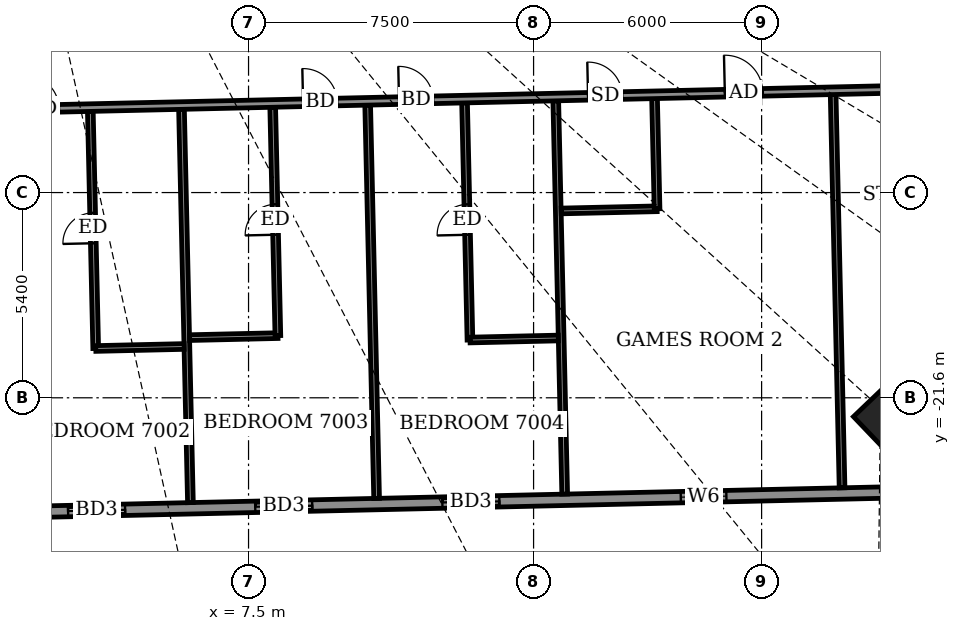
"""IFC4 building model, lengths in metres.
Left out: names, types, materials, properties, quantities, classifications, styles, units other than length and angle.
Written with IfcOpenShell. Run it as: python <this file> out.ifc"""

import sys

from ifc_helpers import new_model, si_unit, direction, frame, frame_2d, origin, origin_2d, place, context, subcontext, project, spatial, rectangle, extrude, element, fill, save


model = new_model("IFC4")
c1 = context("Model", 3, precision=1e-05, world=origin(), true_north=direction((0.0, 1.0)))
c2 = subcontext(c1, "Body", "Model", "MODEL_VIEW")
j1 = project(units=[si_unit("LENGTHUNIT", "METRE"), si_unit("PLANEANGLEUNIT", "RADIAN")], contexts=[c1])
p1 = place(None, origin())
s1 = spatial("IfcSite", under=j1, at=p1, CompositionType="ELEMENT")
p2 = place(p1, origin())
s2 = spatial("IfcBuilding", under=s1, at=p2, CompositionType="ELEMENT")
p3 = place(p2, frame((0.0, 0.0, 275.3)))
s3 = spatial("IfcBuildingStorey", under=s2, at=p3, CompositionType="ELEMENT", Elevation=275.3)
p4 = place(p3, frame((24.124, -22.113, -0.55), z_axis=(0.0, 0.0, 1.0), x_axis=(0.722976563275, 0.690872556232, 0.0)))
e1 = element("IfcColumn", 1, at=p4, inside=s3, PredefinedType="COLUMN", context=c2, shape_type="SweptSolid", body=[
    extrude(rectangle(XDim=1.0, YDim=1.0, at=origin_2d()), origin(), (0.0, 0.0, 1.0), 4.6),
])
p5 = place(p3, frame((-22.816, -25.161, 0.0), z_axis=(0.0, 0.0, 1.0), x_axis=(0.999742646411, 0.022685699159, 0.0)))
e2 = element("IfcWall", 2, at=p5, inside=s3, PredefinedType="SOLIDWALL", context=c2, shape_type="SweptSolid", body=[
    extrude(rectangle(XDim=49.236, YDim=0.3, at=frame_2d((24.618, 0.0))), origin(), (0.0, 0.0, 1.0), 2.1),
])
p6 = place(p5, frame((2.56, 0.0, 0.0)))
e3 = element("IfcOpeningElement", 3, at=p6, cuts=e2, PredefinedType="OPENING", context=c2, shape_type="SweptSolid", body=[
    extrude(rectangle(XDim=1.5, YDim=2.0, at=frame_2d((0.75, 1.0))), frame((0.0, 0.16, 0.0), z_axis=(0.0, -1.0, 0.0), x_axis=(1.0, 0.0, 0.0)), (0.0, 0.0, 1.0), 0.32),
])
p7 = place(p5, frame((9.417, 0.0, 0.5)))
e4 = element("IfcOpeningElement", 4, at=p7, cuts=e2, PredefinedType="OPENING", context=c2, shape_type="SweptSolid", body=[
    extrude(rectangle(XDim=1.2, YDim=1.1, at=frame_2d((0.6, 0.55))), frame((0.0, 0.16, 0.0), z_axis=(0.0, -1.0, 0.0), x_axis=(1.0, 0.0, 0.0)), (0.0, 0.0, 1.0), 0.32),
])
p8 = place(p5, frame((15.664, 0.0, 0.5)))
e5 = element("IfcOpeningElement", 5, at=p8, cuts=e2, PredefinedType="OPENING", context=c2, shape_type="SweptSolid", body=[
    extrude(rectangle(XDim=1.2, YDim=1.1, at=frame_2d((0.6, 0.55))), frame((0.0, 0.16, 0.0), z_axis=(0.0, -1.0, 0.0), x_axis=(1.0, 0.0, 0.0)), (0.0, 0.0, 1.0), 0.32),
])
p9 = place(p5, frame((21.326, 0.0, 0.0)))
e6 = element("IfcOpeningElement", 6, at=p9, cuts=e2, PredefinedType="OPENING", context=c2, shape_type="SweptSolid", body=[
    extrude(rectangle(XDim=1.5, YDim=2.0, at=frame_2d((0.75, 1.0))), frame((0.0, 0.16, 0.0), z_axis=(0.0, -1.0, 0.0), x_axis=(1.0, 0.0, 0.0)), (0.0, 0.0, 1.0), 0.32),
])
p10 = place(p5, frame((25.575, 0.0, 0.0)))
e7 = element("IfcOpeningElement", 7, at=p10, cuts=e2, PredefinedType="OPENING", context=c2, shape_type="SweptSolid", body=[
    extrude(rectangle(XDim=1.5, YDim=2.0, at=frame_2d((0.75, 1.0))), frame((0.0, 0.16, 0.0), z_axis=(0.0, -1.0, 0.0), x_axis=(1.0, 0.0, 0.0)), (0.0, 0.0, 1.0), 0.32),
])
p11 = place(p5, frame((30.5, 0.0, 0.0)))
e8 = element("IfcOpeningElement", 8, at=p11, cuts=e2, PredefinedType="OPENING", context=c2, shape_type="SweptSolid", body=[
    extrude(rectangle(XDim=1.5, YDim=2.0, at=frame_2d((0.75, 1.0))), frame((0.0, 0.16, 0.0), z_axis=(0.0, -1.0, 0.0), x_axis=(1.0, 0.0, 0.0)), (0.0, 0.0, 1.0), 0.32),
])
p12 = place(p5, frame((35.425, 0.0, 0.0)))
e9 = element("IfcOpeningElement", 9, at=p12, cuts=e2, PredefinedType="OPENING", context=c2, shape_type="SweptSolid", body=[
    extrude(rectangle(XDim=1.5, YDim=2.0, at=frame_2d((0.75, 1.0))), frame((0.0, 0.16, 0.0), z_axis=(0.0, -1.0, 0.0), x_axis=(1.0, 0.0, 0.0)), (0.0, 0.0, 1.0), 0.32),
])
p13 = place(p5, frame((41.7, 0.0, 0.5)))
e10 = element("IfcOpeningElement", 10, at=p13, cuts=e2, PredefinedType="OPENING", context=c2, shape_type="SweptSolid", body=[
    extrude(rectangle(XDim=1.2, YDim=1.1, at=frame_2d((0.6, 0.55))), frame((0.0, 0.16, 0.0), z_axis=(0.0, -1.0, 0.0), x_axis=(1.0, 0.0, 0.0)), (0.0, 0.0, 1.0), 0.32),
])
p14 = place(p5, frame((47.068, 0.0, 0.5)))
e11 = element("IfcOpeningElement", 11, at=p14, cuts=e2, PredefinedType="OPENING", context=c2, shape_type="SweptSolid", body=[
    extrude(rectangle(XDim=1.2, YDim=1.1, at=frame_2d((0.6, 0.55))), frame((0.0, 0.16, 0.0), z_axis=(0.0, -1.0, 0.0), x_axis=(1.0, 0.0, 0.0)), (0.0, 0.0, 1.0), 0.32),
])
p15 = place(p3, frame((5.971, -24.358, 0.0), z_axis=(0.0, 0.0, 1.0), x_axis=(-0.022690865001, 0.999742529177, 0.0)))
e12 = element("IfcWall", 12, at=p15, inside=s3, PredefinedType="PARTITIONING", context=c2, shape_type="SweptSolid", body=[
    extrude(rectangle(XDim=10.351, YDim=0.15, at=frame_2d((5.175, 0.0))), origin(), (0.0, 0.0, 1.0), 2.55),
])
p16 = place(p3, frame((10.87, -24.247, 0.0), z_axis=(0.0, 0.0, 1.0), x_axis=(-0.022713904397, 0.999742005993, 0.0)))
e13 = element("IfcWall", 13, at=p16, inside=s3, PredefinedType="PARTITIONING", context=c2, shape_type="SweptSolid", body=[
    extrude(rectangle(XDim=10.351, YDim=0.15, at=frame_2d((5.175, 0.0))), origin(), (0.0, 0.0, 1.0), 2.1),
])
p17 = place(p3, frame((15.819, -24.134, 0.0), z_axis=(0.0, 0.0, 1.0), x_axis=(-0.022716582742, 0.999741945138, 0.0)))
e14 = element("IfcWall", 14, at=p17, inside=s3, PredefinedType="PARTITIONING", context=c2, shape_type="SweptSolid", body=[
    extrude(rectangle(XDim=10.35, YDim=0.15, at=frame_2d((5.175, 0.0))), origin(), (0.0, 0.0, 1.0), 2.1),
])
p18 = place(p3, frame((23.117, -23.969, 0.0), z_axis=(0.0, 0.0, 1.0), x_axis=(-0.022690865001, 0.999742529177, 0.0)))
e15 = element("IfcWall", 15, at=p18, inside=s3, PredefinedType="PARTITIONING", context=c2, shape_type="SweptSolid", body=[
    extrude(rectangle(XDim=10.351, YDim=0.15, at=frame_2d((5.175, 0.0))), origin(), (0.0, 0.0, 1.0), 2.25),
])
p19 = place(p3, frame((3.479, -20.303, 0.0), z_axis=(0.0, 0.0, 1.0), x_axis=(-0.022772066746, 0.999740682865, 0.0)))
e16 = element("IfcWall", 16, at=p19, inside=s3, PredefinedType="PARTITIONING", context=c2, shape_type="SweptSolid", body=[
    extrude(rectangle(XDim=6.24, YDim=0.15, at=frame_2d((3.12, 0.0))), origin(), (0.0, 0.0, 1.0), 2.55),
])
p20 = place(p19, frame((2.77, 0.0, 0.0)))
e17 = element("IfcOpeningElement", 17, at=p20, cuts=e16, PredefinedType="OPENING", context=c2, shape_type="SweptSolid", body=[
    extrude(rectangle(XDim=0.8, YDim=2.1, at=frame_2d((0.4, 1.05))), frame((0.0, 0.085, 0.0), z_axis=(0.0, -1.0, 0.0), x_axis=(1.0, 0.0, 0.0)), (0.0, 0.0, 1.0), 0.17),
])
p21 = place(p3, frame((3.481, -20.303, 0.0), z_axis=(0.0, 0.0, 1.0), x_axis=(0.999740260747, 0.02279059109, 0.0)))
e18 = element("IfcWall", 18, at=p21, inside=s3, PredefinedType="PARTITIONING", context=c2, shape_type="SweptSolid", body=[
    extrude(rectangle(XDim=2.324, YDim=0.15, at=frame_2d((1.162, 0.0))), origin(), (0.0, 0.0, 1.0), 2.55),
])
p22 = place(p3, frame((13.326, -20.08, 0.0), z_axis=(0.0, 0.0, 1.0), x_axis=(-0.02272940328, 0.999741653742, 0.0)))
e19 = element("IfcWall", 19, at=p22, inside=s3, PredefinedType="PARTITIONING", context=c2, shape_type="SweptSolid", body=[
    extrude(rectangle(XDim=6.241, YDim=0.15, at=frame_2d((3.12, 0.0))), origin(), (0.0, 0.0, 1.0), 2.1),
])
p23 = place(p22, frame((2.77, 0.0, 0.0)))
e20 = element("IfcOpeningElement", 20, at=p23, cuts=e19, PredefinedType="OPENING", context=c2, shape_type="SweptSolid", body=[
    extrude(rectangle(XDim=0.8, YDim=2.1, at=frame_2d((0.4, 1.05))), frame((0.0, 0.085, 0.0), z_axis=(0.0, -1.0, 0.0), x_axis=(1.0, 0.0, 0.0)), (0.0, 0.0, 1.0), 0.17),
])
p24 = place(p3, frame((13.328, -20.08, 0.0), z_axis=(0.0, 0.0, 1.0), x_axis=(0.99974031529, 0.022788198363, 0.0)))
e21 = element("IfcWall", 21, at=p24, inside=s3, PredefinedType="PARTITIONING", context=c2, shape_type="SweptSolid", body=[
    extrude(rectangle(XDim=2.325, YDim=0.15, at=frame_2d((1.162, 0.0))), origin(), (0.0, 0.0, 1.0), 2.1),
])
p25 = place(p3, frame((5.95, -20.017, 0.0), z_axis=(0.0, 0.0, 1.0), x_axis=(0.999740260747, 0.02279059109, 0.0)))
e22 = element("IfcWall", 22, at=p25, inside=s3, PredefinedType="PARTITIONING", context=c2, shape_type="SweptSolid", body=[
    extrude(rectangle(XDim=2.324, YDim=0.15, at=frame_2d((1.162, 0.0))), origin(), (0.0, 0.0, 1.0), 4.05),
])
p26 = place(p3, frame((8.272, -19.964, 0.0), z_axis=(0.0, 0.0, 1.0), x_axis=(-0.022628200247, 0.999743949496, 0.0)))
e23 = element("IfcWall", 23, at=p26, inside=s3, PredefinedType="PARTITIONING", context=c2, shape_type="SweptSolid", body=[
    extrude(rectangle(XDim=6.01, YDim=0.15, at=frame_2d((3.005, 0.0))), origin(), (0.0, 0.0, 1.0), 2.35),
])
p27 = place(p26, frame((2.655, 0.0, 0.0)))
e24 = element("IfcOpeningElement", 24, at=p27, cuts=e23, PredefinedType="OPENING", context=c2, shape_type="SweptSolid", body=[
    extrude(rectangle(XDim=0.8, YDim=2.1, at=frame_2d((0.4, 1.05))), frame((0.0, 0.085, 0.0), z_axis=(0.0, -1.0, 0.0), x_axis=(1.0, 0.0, 0.0)), (0.0, 0.0, 1.0), 0.17),
])
p28 = place(p3, frame((15.727, -16.684, 0.0), z_axis=(0.0, 0.0, 1.0), x_axis=(0.99974392816, 0.022629142889, 0.0)))
e25 = element("IfcWall", 25, at=p28, inside=s3, PredefinedType="PARTITIONING", context=c2, shape_type="SweptSolid", body=[
    extrude(rectangle(XDim=2.525, YDim=0.15, at=frame_2d((1.262, 0.0))), origin(), (0.0, 0.0, 1.0), 2.45),
])
p29 = place(p3, frame((18.249, -16.627, 0.0), z_axis=(0.0, 0.0, 1.0), x_axis=(-0.022732880677, 0.999741574676, 0.0)))
e26 = element("IfcWall", 26, at=p29, inside=s3, PredefinedType="PARTITIONING", context=c2, shape_type="SweptSolid", body=[
    extrude(rectangle(XDim=2.9, YDim=0.15, at=frame_2d((1.45, 0.0))), origin(), (0.0, 0.0, 1.0), 2.25),
])
p30 = place(p3, frame((-23.895, -14.583, 0.0), z_axis=(0.0, 0.0, 1.0), x_axis=(0.999742444101, 0.022694613067, 0.0)))
e27 = element("IfcWall", 27, at=p30, inside=s3, PredefinedType="PARTITIONING", context=c2, shape_type="SweptSolid", body=[
    extrude(rectangle(XDim=54.025, YDim=0.2, at=frame_2d((27.012, 0.0))), origin(), (0.0, 0.0, 1.0), 2.1),
])
p31 = place(p30, frame((0.414, 0.0, 0.0)))
e28 = element("IfcOpeningElement", 28, at=p31, cuts=e27, PredefinedType="OPENING", context=c2, shape_type="SweptSolid", body=[
    extrude(rectangle(XDim=1.0, YDim=2.1, at=frame_2d((0.5, 1.05))), frame((0.0, 0.11, 0.0), z_axis=(0.0, -1.0, 0.0), x_axis=(1.0, 0.0, 0.0)), (0.0, 0.0, 1.0), 0.22),
])
p32 = place(p30, frame((6.289, 0.0, 0.0)))
e29 = element("IfcOpeningElement", 29, at=p32, cuts=e27, PredefinedType="OPENING", context=c2, shape_type="SweptSolid", body=[
    extrude(rectangle(XDim=0.9, YDim=2.1, at=frame_2d((0.45, 1.05))), frame((0.0, 0.11, 0.0), z_axis=(0.0, -1.0, 0.0), x_axis=(1.0, 0.0, 0.0)), (0.0, 0.0, 1.0), 0.22),
])
p33 = place(p30, frame((11.589, 0.0, 0.0)))
e30 = element("IfcOpeningElement", 30, at=p33, cuts=e27, PredefinedType="OPENING", context=c2, shape_type="SweptSolid", body=[
    extrude(rectangle(XDim=1.0, YDim=2.1, at=frame_2d((0.5, 1.05))), frame((0.0, 0.11, 0.0), z_axis=(0.0, -1.0, 0.0), x_axis=(1.0, 0.0, 0.0)), (0.0, 0.0, 1.0), 0.22),
])
p34 = place(p30, frame((8.689, 0.0, 0.0)))
e31 = element("IfcOpeningElement", 31, at=p34, cuts=e27, PredefinedType="OPENING", context=c2, shape_type="SweptSolid", body=[
    extrude(rectangle(XDim=0.9, YDim=2.1, at=frame_2d((0.45, 1.05))), frame((0.0, 0.11, 0.0), z_axis=(0.0, -1.0, 0.0), x_axis=(1.0, 0.0, 0.0)), (0.0, 0.0, 1.0), 0.22),
])
p35 = place(p30, frame((15.014, 0.0, 0.0)))
e32 = element("IfcOpeningElement", 32, at=p35, cuts=e27, PredefinedType="OPENING", context=c2, shape_type="SweptSolid", body=[
    extrude(rectangle(XDim=1.0, YDim=2.1, at=frame_2d((0.5, 1.05))), frame((0.0, 0.11, 0.0), z_axis=(0.0, -1.0, 0.0), x_axis=(1.0, 0.0, 0.0)), (0.0, 0.0, 1.0), 0.22),
])
p36 = place(p30, frame((18.039, 0.0, 0.0)))
e33 = element("IfcOpeningElement", 33, at=p36, cuts=e27, PredefinedType="OPENING", context=c2, shape_type="SweptSolid", body=[
    extrude(rectangle(XDim=0.9, YDim=2.1, at=frame_2d((0.45, 1.05))), frame((0.0, 0.11, 0.0), z_axis=(0.0, -1.0, 0.0), x_axis=(1.0, 0.0, 0.0)), (0.0, 0.0, 1.0), 0.22),
])
p37 = place(p30, frame((22.989, 0.0, 0.0)))
e34 = element("IfcOpeningElement", 34, at=p37, cuts=e27, PredefinedType="OPENING", context=c2, shape_type="SweptSolid", body=[
    extrude(rectangle(XDim=0.9, YDim=2.1, at=frame_2d((0.45, 1.05))), frame((0.0, 0.11, 0.0), z_axis=(0.0, -1.0, 0.0), x_axis=(1.0, 0.0, 0.0)), (0.0, 0.0, 1.0), 0.22),
])
p38 = place(p30, frame((25.514, 0.0, 0.0)))
e35 = element("IfcOpeningElement", 35, at=p38, cuts=e27, PredefinedType="OPENING", context=c2, shape_type="SweptSolid", body=[
    extrude(rectangle(XDim=0.9, YDim=2.1, at=frame_2d((0.45, 1.05))), frame((0.0, 0.11, 0.0), z_axis=(0.0, -1.0, 0.0), x_axis=(1.0, 0.0, 0.0)), (0.0, 0.0, 1.0), 0.22),
])
p39 = place(p30, frame((32.839, 0.0, 0.0)))
e36 = element("IfcOpeningElement", 36, at=p39, cuts=e27, PredefinedType="OPENING", context=c2, shape_type="SweptSolid", body=[
    extrude(rectangle(XDim=0.9, YDim=2.1, at=frame_2d((0.45, 1.05))), frame((0.0, 0.11, 0.0), z_axis=(0.0, -1.0, 0.0), x_axis=(1.0, 0.0, 0.0)), (0.0, 0.0, 1.0), 0.22),
])
p40 = place(p30, frame((35.364, 0.0, 0.0)))
e37 = element("IfcOpeningElement", 37, at=p40, cuts=e27, PredefinedType="OPENING", context=c2, shape_type="SweptSolid", body=[
    extrude(rectangle(XDim=0.9, YDim=2.1, at=frame_2d((0.45, 1.05))), frame((0.0, 0.11, 0.0), z_axis=(0.0, -1.0, 0.0), x_axis=(1.0, 0.0, 0.0)), (0.0, 0.0, 1.0), 0.22),
])
p41 = place(p30, frame((43.939, 0.0, 0.0)))
e38 = element("IfcOpeningElement", 38, at=p41, cuts=e27, PredefinedType="OPENING", context=c2, shape_type="SweptSolid", body=[
    extrude(rectangle(XDim=1.0, YDim=2.1, at=frame_2d((0.5, 1.05))), frame((0.0, 0.11, 0.0), z_axis=(0.0, -1.0, 0.0), x_axis=(1.0, 0.0, 0.0)), (0.0, 0.0, 1.0), 0.22),
])
p42 = place(p30, frame((40.339, 0.0, 0.0)))
e39 = element("IfcOpeningElement", 39, at=p42, cuts=e27, PredefinedType="OPENING", context=c2, shape_type="SweptSolid", body=[
    extrude(rectangle(XDim=0.9, YDim=2.1, at=frame_2d((0.45, 1.05))), frame((0.0, 0.11, 0.0), z_axis=(0.0, -1.0, 0.0), x_axis=(1.0, 0.0, 0.0)), (0.0, 0.0, 1.0), 0.22),
])
p43 = place(p30, frame((50.035, 0.0, 0.0)))
e40 = element("IfcOpeningElement", 40, at=p43, cuts=e27, PredefinedType="OPENING", context=c2, shape_type="SweptSolid", body=[
    extrude(rectangle(XDim=1.0, YDim=2.1, at=frame_2d((0.5, 1.05))), frame((0.0, 0.11, 0.0), z_axis=(0.0, -1.0, 0.0), x_axis=(1.0, 0.0, 0.0)), (0.0, 0.0, 1.0), 0.22),
])
p44 = place(p10, origin())
e41 = element("IfcDoor", 41, at=p44, inside=s3, OperationType="SLIDING_TO_LEFT", PredefinedType="DOOR", context=c2, shape_type="SweptSolid", body=[
    extrude(rectangle(XDim=1.5, YDim=2.0, at=frame_2d((0.75, 1.0))), frame((0.0, 0.025, 0.0), z_axis=(0.0, -1.0, 0.0), x_axis=(1.0, 0.0, 0.0)), (0.0, 0.0, 1.0), 0.05),
])
fill(e7, e41)
p45 = place(p11, origin())
e42 = element("IfcDoor", 42, at=p45, inside=s3, OperationType="SLIDING_TO_LEFT", PredefinedType="DOOR", context=c2, shape_type="SweptSolid", body=[
    extrude(rectangle(XDim=1.5, YDim=2.0, at=frame_2d((0.75, 1.0))), frame((0.0, 0.025, 0.0), z_axis=(0.0, -1.0, 0.0), x_axis=(1.0, 0.0, 0.0)), (0.0, 0.0, 1.0), 0.05),
])
fill(e8, e42)
p46 = place(p12, origin())
e43 = element("IfcDoor", 43, at=p46, inside=s3, OperationType="SLIDING_TO_LEFT", PredefinedType="DOOR", context=c2, shape_type="SweptSolid", body=[
    extrude(rectangle(XDim=1.5, YDim=2.0, at=frame_2d((0.75, 1.0))), frame((0.0, 0.025, 0.0), z_axis=(0.0, -1.0, 0.0), x_axis=(1.0, 0.0, 0.0)), (0.0, 0.0, 1.0), 0.05),
])
fill(e9, e43)
p47 = place(p13, origin())
e44 = element("IfcWindow", 44, at=p47, inside=s3, PartitioningType="SINGLE_PANEL", PredefinedType="WINDOW", context=c2, shape_type="SweptSolid", body=[
    extrude(rectangle(XDim=1.2, YDim=1.1, at=frame_2d((0.6, 0.55))), frame((0.0, 0.03, 0.0), z_axis=(0.0, -1.0, 0.0), x_axis=(1.0, 0.0, 0.0)), (0.0, 0.0, 1.0), 0.06),
])
fill(e10, e44)
p48 = place(p38, origin())
e45 = element("IfcDoor", 45, at=p48, inside=s3, OperationType="SINGLE_SWING_RIGHT", PredefinedType="DOOR", context=c2, shape_type="SweptSolid", body=[
    extrude(rectangle(XDim=0.9, YDim=2.1, at=frame_2d((0.45, 1.05))), frame((0.0, 0.025, 0.0), z_axis=(0.0, -1.0, 0.0), x_axis=(1.0, 0.0, 0.0)), (0.0, 0.0, 1.0), 0.05),
])
fill(e35, e45)
p49 = place(p20, origin())
e46 = element("IfcDoor", 46, at=p49, inside=s3, OperationType="SINGLE_SWING_RIGHT", PredefinedType="DOOR", context=c2, shape_type="SweptSolid", body=[
    extrude(rectangle(XDim=0.8, YDim=2.1, at=frame_2d((0.4, 1.05))), frame((0.0, 0.025, 0.0), z_axis=(0.0, -1.0, 0.0), x_axis=(1.0, 0.0, 0.0)), (0.0, 0.0, 1.0), 0.05),
])
fill(e17, e46)
p50 = place(p39, origin())
e47 = element("IfcDoor", 47, at=p50, inside=s3, OperationType="SINGLE_SWING_LEFT", PredefinedType="DOOR", context=c2, shape_type="SweptSolid", body=[
    extrude(rectangle(XDim=0.9, YDim=2.1, at=frame_2d((0.45, 1.05))), frame((0.0, 0.025, 0.0), z_axis=(0.0, -1.0, 0.0), x_axis=(1.0, 0.0, 0.0)), (0.0, 0.0, 1.0), 0.05),
])
fill(e36, e47)
p51 = place(p27, origin())
e48 = element("IfcDoor", 48, at=p51, inside=s3, OperationType="SINGLE_SWING_LEFT", PredefinedType="DOOR", context=c2, shape_type="SweptSolid", body=[
    extrude(rectangle(XDim=0.8, YDim=2.1, at=frame_2d((0.4, 1.05))), frame((0.0, 0.025, 0.0), z_axis=(0.0, -1.0, 0.0), x_axis=(1.0, 0.0, 0.0)), (0.0, 0.0, 1.0), 0.05),
])
fill(e24, e48)
p52 = place(p40, origin())
e49 = element("IfcDoor", 49, at=p52, inside=s3, OperationType="SINGLE_SWING_RIGHT", PredefinedType="DOOR", context=c2, shape_type="SweptSolid", body=[
    extrude(rectangle(XDim=0.9, YDim=2.1, at=frame_2d((0.45, 1.05))), frame((0.0, 0.025, 0.0), z_axis=(0.0, -1.0, 0.0), x_axis=(1.0, 0.0, 0.0)), (0.0, 0.0, 1.0), 0.05),
])
fill(e37, e49)
p53 = place(p23, origin())
e50 = element("IfcDoor", 50, at=p53, inside=s3, OperationType="SINGLE_SWING_RIGHT", PredefinedType="DOOR", context=c2, shape_type="SweptSolid", body=[
    extrude(rectangle(XDim=0.8, YDim=2.1, at=frame_2d((0.4, 1.05))), frame((0.0, 0.025, 0.0), z_axis=(0.0, -1.0, 0.0), x_axis=(1.0, 0.0, 0.0)), (0.0, 0.0, 1.0), 0.05),
])
fill(e20, e50)
p54 = place(p41, origin())
e51 = element("IfcDoor", 51, at=p54, inside=s3, OperationType="SINGLE_SWING_RIGHT", PredefinedType="DOOR", context=c2, shape_type="SweptSolid", body=[
    extrude(rectangle(XDim=1.0, YDim=2.1, at=frame_2d((0.5, 1.05))), frame((0.0, 0.025, 0.0), z_axis=(0.0, -1.0, 0.0), x_axis=(1.0, 0.0, 0.0)), (0.0, 0.0, 1.0), 0.05),
])
fill(e38, e51)
p55 = place(p42, origin())
e52 = element("IfcDoor", 52, at=p55, inside=s3, OperationType="SINGLE_SWING_RIGHT", PredefinedType="DOOR", context=c2, shape_type="SweptSolid", body=[
    extrude(rectangle(XDim=0.9, YDim=2.1, at=frame_2d((0.45, 1.05))), frame((0.0, 0.025, 0.0), z_axis=(0.0, -1.0, 0.0), x_axis=(1.0, 0.0, 0.0)), (0.0, 0.0, 1.0), 0.05),
])
fill(e39, e52)
save(model, sys.argv[1])
